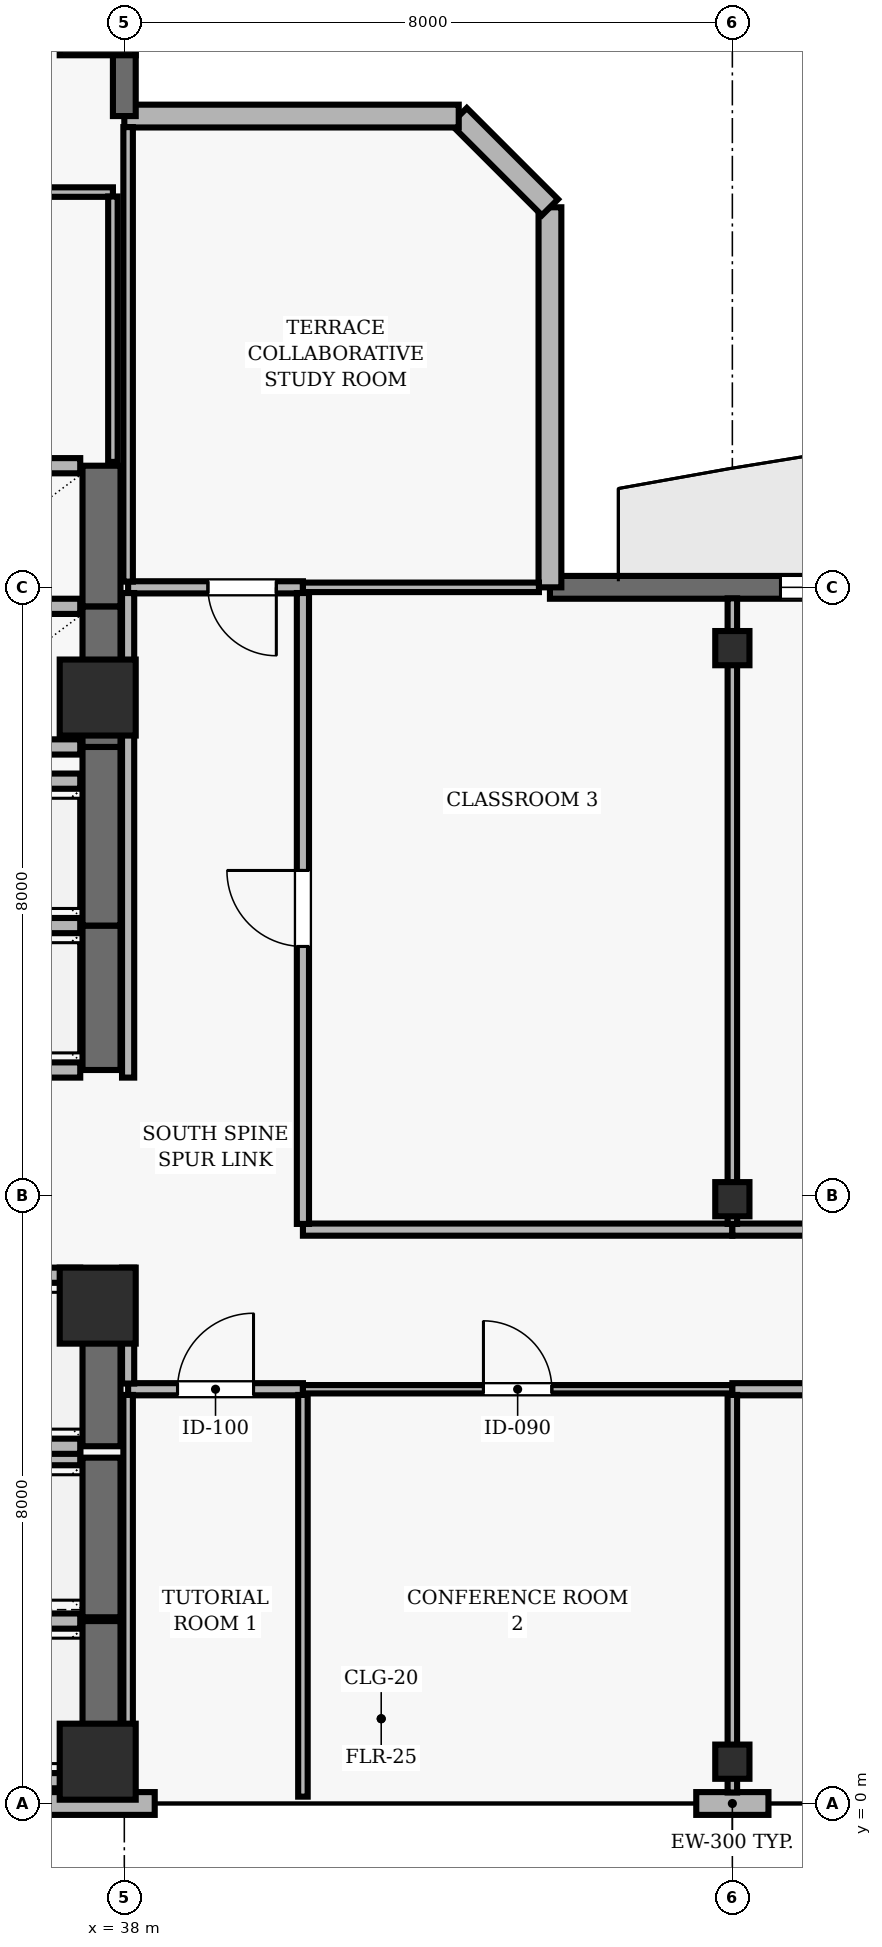
"""IFC4 building model, lengths in metres.
Left out: names, types, materials, properties, quantities, classifications, styles, units other than length and angle.
Written with IfcOpenShell. Run it as: python <this file> out.ifc"""

import sys

from ifc_helpers import new_model, si_unit, direction, frame, frame_2d, origin, origin_2d, place, context, subcontext, project, spatial, rectangle, hollow_rectangle, extrude, element, fill, save


model = new_model("IFC4")
c1 = context("Model", 3, precision=1e-05, world=origin(), true_north=direction((0.0, 1.0)))
c2 = subcontext(c1, "Body", "Model", "MODEL_VIEW")
j1 = project(units=[si_unit("LENGTHUNIT", "METRE"), si_unit("PLANEANGLEUNIT", "RADIAN")], contexts=[c1])
p1 = place(None, origin())
s1 = spatial("IfcSite", under=j1, at=p1, CompositionType="ELEMENT")
p2 = place(p1, origin())
s2 = spatial("IfcBuilding", under=s1, at=p2, CompositionType="ELEMENT")
p3 = place(p2, frame((0.0, 0.0, 230.4)))
s3 = spatial("IfcBuildingStorey", under=s2, at=p3, CompositionType="ELEMENT", Elevation=230.4)
for number, where, z_axis, x_axis in (
    (1, (37.65, 0.55, 0.0), (0.0, 0.0, 1.0), (1.0, 0.0, 0.0)),
    (2, (37.65, 6.55, 0.0), (0.0, 0.0, 1.0), (1.0, 0.0, 0.0)),
    (3, (37.65, 14.55, 0.0), (0.0, 0.0, 1.0), (1.0, 0.0, 0.0)),
    (4, (37.65, 23.5, 0.0), (0.0, 0.0, 1.0), (1.0, 0.0, 0.0)),
):
    element("IfcColumn", number, at=place(p3, frame(where, z_axis=z_axis, x_axis=x_axis)), inside=s3, PredefinedType="COLUMN", context=c2, shape_type="SweptSolid", body=[
        extrude(rectangle(XDim=1.0, YDim=1.0, at=origin_2d()), origin(), (0.0, 0.0, 1.0), 3.9),
    ])
for number, where, z_axis, x_axis in (
    (5, (46.0, 0.55, 0.0), (0.0, 0.0, 1.0), (1.0, 0.0, 0.0)),
    (6, (46.0, 7.95, 0.0), (0.0, 0.0, 1.0), (1.0, 0.0, 0.0)),
    (7, (46.0, 15.2, 0.0), (0.0, 0.0, 1.0), (1.0, 0.0, 0.0)),
):
    element("IfcColumn", number, at=place(p3, frame(where, z_axis=z_axis, x_axis=x_axis)), inside=s3, PredefinedType="COLUMN", context=c2, shape_type="SweptSolid", body=[
        extrude(hollow_rectangle(XDim=0.45, YDim=0.45, WallThickness=0.02, at=origin_2d()), origin(), (0.0, 0.0, 1.0), 3.9),
    ])
p4 = place(p3, frame((31.0, 0.0, 0.0), z_axis=(0.0, 0.0, 1.0), x_axis=(1.0, 0.0, 0.0)))
e8 = element("IfcWall", 8, at=p4, inside=s3, PredefinedType="SOLIDWALL", context=c2, shape_type="SweptSolid", body=[
    extrude(rectangle(XDim=7.4, YDim=0.3, at=frame_2d((3.7, 0.0))), origin(), (0.0, 0.0, 1.0), 3.69),
])
p5 = place(p3, frame((45.525, 0.0, 0.0), z_axis=(0.0, 0.0, 1.0), x_axis=(1.0, 0.0, 0.0)))
e9 = element("IfcWall", 9, at=p5, inside=s3, PredefinedType="SOLIDWALL", context=c2, shape_type="SweptSolid", body=[
    extrude(rectangle(XDim=0.95, YDim=0.3, at=frame_2d((0.475, 0.0))), origin(), (0.0, 0.0, 1.0), 3.69),
])
p6 = place(p3, frame((62.7, 16.0, 0.0), z_axis=(0.0, 0.0, 1.0), x_axis=(-1.0, 0.0, 0.0)))
e10 = element("IfcWall", 10, at=p6, inside=s3, PredefinedType="SOLIDWALL", context=c2, shape_type="SweptSolid", body=[
    extrude(rectangle(XDim=19.1, YDim=0.3, at=frame_2d((9.55, 0.0))), origin(), (0.0, 0.0, 1.0), 3.69),
])
p7 = place(p6, frame((6.75, 0.0, 0.0)))
e11 = element("IfcOpeningElement", 11, at=p7, cuts=e10, PredefinedType="OPENING", context=c2, shape_type="SweptSolid", body=[
    extrude(rectangle(XDim=1.0, YDim=2.2, at=frame_2d((0.5, 1.1))), frame((0.0, 0.16, 0.0), z_axis=(0.0, -1.0, 0.0), x_axis=(1.0, 0.0, 0.0)), (0.0, 0.0, 1.0), 0.32),
])
p8 = place(p6, frame((9.85, 0.0, 0.9)))
e12 = element("IfcOpeningElement", 12, at=p8, cuts=e10, PredefinedType="OPENING", context=c2, shape_type="SweptSolid", body=[
    extrude(rectangle(XDim=1.2, YDim=1.6, at=frame_2d((0.6, 0.8))), frame((0.0, 0.16, 0.0), z_axis=(0.0, -1.0, 0.0), x_axis=(1.0, 0.0, 0.0)), (0.0, 0.0, 1.0), 0.32),
])
p9 = place(p6, frame((14.867, 0.0, 0.9)))
e13 = element("IfcOpeningElement", 13, at=p9, cuts=e10, PredefinedType="OPENING", context=c2, shape_type="SweptSolid", body=[
    extrude(rectangle(XDim=1.2, YDim=1.6, at=frame_2d((0.6, 0.8))), frame((0.0, 0.16, 0.0), z_axis=(0.0, -1.0, 0.0), x_axis=(1.0, 0.0, 0.0)), (0.0, 0.0, 1.0), 0.32),
])
p10 = place(p3, frame((43.6, 16.0, 0.0), z_axis=(0.0, 0.0, 1.0), x_axis=(0.0, 1.0, 0.0)))
e14 = element("IfcWall", 14, at=p10, inside=s3, PredefinedType="SOLIDWALL", context=c2, shape_type="SweptSolid", body=[
    extrude(rectangle(XDim=5.0, YDim=0.3, at=frame_2d((2.5, 0.0))), origin(), (0.0, 0.0, 1.0), 3.69),
])
p11 = place(p3, frame((43.6, 21.0, 0.0), z_axis=(0.0, 0.0, 1.0), x_axis=(-0.707178703759, 0.707034851297, 0.0)))
e15 = element("IfcWall", 15, at=p11, inside=s3, PredefinedType="SOLIDWALL", context=c2, shape_type="SweptSolid", body=[
    extrude(rectangle(XDim=1.697, YDim=0.3, at=frame_2d((0.849, 0.0))), origin(), (0.0, 0.0, 1.0), 3.69),
])
p12 = place(p3, frame((42.4, 22.2, 0.0), z_axis=(0.0, 0.0, 1.0), x_axis=(-1.0, 0.0, 0.0)))
e16 = element("IfcWall", 16, at=p12, inside=s3, PredefinedType="SOLIDWALL", context=c2, shape_type="SweptSolid", body=[
    extrude(rectangle(XDim=4.4, YDim=0.3, at=frame_2d((2.2, 0.0))), origin(), (0.0, 0.0, 1.0), 3.69),
])
p13 = place(p3, frame((38.0, 22.2, 0.0), z_axis=(0.0, 0.0, 1.0), x_axis=(0.0, 1.0, 0.0)))
e17 = element("IfcWall", 17, at=p13, inside=s3, PredefinedType="SOLIDWALL", context=c2, shape_type="SweptSolid", body=[
    extrude(rectangle(XDim=18.5, YDim=0.3, at=frame_2d((9.25, 0.0))), origin(), (0.0, 0.0, 1.0), 3.69),
])
p14 = place(p13, frame((11.05, 0.0, 0.0)))
e18 = element("IfcOpeningElement", 18, at=p14, cuts=e17, PredefinedType="OPENING", context=c2, shape_type="SweptSolid", body=[
    extrude(rectangle(XDim=1.0, YDim=2.2, at=frame_2d((0.5, 1.1))), frame((0.0, 0.16, 0.0), z_axis=(0.0, -1.0, 0.0), x_axis=(1.0, 0.0, 0.0)), (0.0, 0.0, 1.0), 0.32),
])
p15 = place(p3, frame((37.7, 0.3, 0.0), z_axis=(0.0, 0.0, 1.0), x_axis=(0.0, 1.0, 0.0)))
e19 = element("IfcWall", 19, at=p15, inside=s3, PredefinedType="SHEAR", context=c2, shape_type="SweptSolid", body=[
    extrude(rectangle(XDim=2.1, YDim=0.5, at=frame_2d((1.05, 0.0))), origin(), (0.0, 0.0, 1.0), 3.69),
])
for number, where, z_axis, x_axis in (
    (20, (35.28, 0.3, 0.0), (0.0, 0.0, 1.0), (1.0, 0.0, 0.0)),
    (21, (37.42, 2.4, 0.0), (0.0, 0.0, 1.0), (-1.0, 0.0, 0.0)),
):
    element("IfcWall", number, at=place(p3, frame(where, z_axis=z_axis, x_axis=x_axis)), inside=s3, PredefinedType="SOLIDWALL", context=c2, shape_type="SweptSolid", body=[
        extrude(rectangle(XDim=2.14, YDim=0.2, at=frame_2d((1.07, 0.0))), origin(), (0.0, 0.0, 1.0), 3.69),
    ])
p16 = place(p3, frame((37.7, 2.45, 0.0), z_axis=(0.0, 0.0, 1.0), x_axis=(0.0, 1.0, 0.0)))
e22 = element("IfcWall", 22, at=p16, inside=s3, PredefinedType="SHEAR", context=c2, shape_type="SweptSolid", body=[
    extrude(rectangle(XDim=2.1, YDim=0.5, at=frame_2d((1.05, 0.0))), origin(), (0.0, 0.0, 1.0), 3.69),
])
p17 = place(p3, frame((37.42, 4.55, 0.0), z_axis=(0.0, 0.0, 1.0), x_axis=(-1.0, 0.0, 0.0)))
e23 = element("IfcWall", 23, at=p17, inside=s3, PredefinedType="SOLIDWALL", context=c2, shape_type="SweptSolid", body=[
    extrude(rectangle(XDim=2.14, YDim=0.2, at=frame_2d((1.07, 0.0))), origin(), (0.0, 0.0, 1.0), 3.69),
])
p18 = place(p3, frame((37.7, 4.7, 0.0), z_axis=(0.0, 0.0, 1.0), x_axis=(0.0, 1.0, 0.0)))
e24 = element("IfcWall", 24, at=p18, inside=s3, PredefinedType="SHEAR", context=c2, shape_type="SweptSolid", body=[
    extrude(rectangle(XDim=2.25, YDim=0.5, at=frame_2d((1.125, 0.0))), origin(), (0.0, 0.0, 1.0), 3.69),
])
for number, where, z_axis, x_axis in (
    (25, (35.28, 4.7, 0.0), (0.0, 0.0, 1.0), (1.0, 0.0, 0.0)),
    (26, (37.42, 6.95, 0.0), (0.0, 0.0, 1.0), (-1.0, 0.0, 0.0)),
):
    element("IfcWall", number, at=place(p3, frame(where, z_axis=z_axis, x_axis=x_axis)), inside=s3, PredefinedType="SOLIDWALL", context=c2, shape_type="SweptSolid", body=[
        extrude(rectangle(XDim=2.14, YDim=0.2, at=frame_2d((1.07, 0.0))), origin(), (0.0, 0.0, 1.0), 3.69),
    ])
p19 = place(p3, frame((37.7, 9.65, 0.0), z_axis=(0.0, 0.0, 1.0), x_axis=(0.0, 1.0, 0.0)))
e27 = element("IfcWall", 27, at=p19, inside=s3, PredefinedType="SHEAR", context=c2, shape_type="SweptSolid", body=[
    extrude(rectangle(XDim=1.9, YDim=0.5, at=frame_2d((0.95, 0.0))), origin(), (0.0, 0.0, 1.0), 3.69),
])
for number, where, z_axis, x_axis in (
    (28, (35.28, 9.65, 0.0), (0.0, 0.0, 1.0), (1.0, 0.0, 0.0)),
    (29, (37.42, 11.55, 0.0), (0.0, 0.0, 1.0), (-1.0, 0.0, 0.0)),
):
    element("IfcWall", number, at=place(p3, frame(where, z_axis=z_axis, x_axis=x_axis)), inside=s3, PredefinedType="SOLIDWALL", context=c2, shape_type="SweptSolid", body=[
        extrude(rectangle(XDim=2.14, YDim=0.2, at=frame_2d((1.07, 0.0))), origin(), (0.0, 0.0, 1.0), 3.69),
    ])
p20 = place(p3, frame((37.7, 11.55, 0.0), z_axis=(0.0, 0.0, 1.0), x_axis=(0.0, 1.0, 0.0)))
e30 = element("IfcWall", 30, at=p20, inside=s3, PredefinedType="SHEAR", context=c2, shape_type="SweptSolid", body=[
    extrude(rectangle(XDim=2.35, YDim=0.5, at=frame_2d((1.175, 0.0))), origin(), (0.0, 0.0, 1.0), 3.69),
])
p21 = place(p3, frame((37.42, 13.45, 0.0), z_axis=(0.0, 0.0, 1.0), x_axis=(-1.0, 0.0, 0.0)))
e31 = element("IfcWall", 31, at=p21, inside=s3, PredefinedType="SOLIDWALL", context=c2, shape_type="SweptSolid", body=[
    extrude(rectangle(XDim=2.14, YDim=0.2, at=frame_2d((1.07, 0.0))), origin(), (0.0, 0.0, 1.0), 3.69),
])
p22 = place(p3, frame((37.7, 13.9, 0.0), z_axis=(0.0, 0.0, 1.0), x_axis=(0.0, 1.0, 0.0)))
e32 = element("IfcWall", 32, at=p22, inside=s3, PredefinedType="SHEAR", context=c2, shape_type="SweptSolid", body=[
    extrude(rectangle(XDim=1.85, YDim=0.5, at=frame_2d((0.925, 0.0))), origin(), (0.0, 0.0, 1.0), 3.69),
])
for number, where, z_axis, x_axis in (
    (33, (35.28, 13.9, 0.0), (0.0, 0.0, 1.0), (1.0, 0.0, 0.0)),
    (34, (37.42, 15.75, 0.0), (0.0, 0.0, 1.0), (-1.0, 0.0, 0.0)),
):
    element("IfcWall", number, at=place(p3, frame(where, z_axis=z_axis, x_axis=x_axis)), inside=s3, PredefinedType="SOLIDWALL", context=c2, shape_type="SweptSolid", body=[
        extrude(rectangle(XDim=2.14, YDim=0.2, at=frame_2d((1.07, 0.0))), origin(), (0.0, 0.0, 1.0), 3.69),
    ])
p23 = place(p3, frame((37.7, 15.75, 0.0), z_axis=(0.0, 0.0, 1.0), x_axis=(0.0, 1.0, 0.0)))
e35 = element("IfcWall", 35, at=p23, inside=s3, PredefinedType="SHEAR", context=c2, shape_type="SweptSolid", body=[
    extrude(rectangle(XDim=1.85, YDim=0.5, at=frame_2d((0.925, 0.0))), origin(), (0.0, 0.0, 1.0), 3.69),
])
p24 = place(p3, frame((37.42, 17.6, 0.0), z_axis=(0.0, 0.0, 1.0), x_axis=(-1.0, 0.0, 0.0)))
e36 = element("IfcWall", 36, at=p24, inside=s3, PredefinedType="SOLIDWALL", context=c2, shape_type="SweptSolid", body=[
    extrude(rectangle(XDim=2.14, YDim=0.2, at=frame_2d((1.07, 0.0))), origin(), (0.0, 0.0, 1.0), 3.69),
])
p25 = place(p3, frame((35.85, 21.2, 0.0), z_axis=(0.0, 0.0, 1.0), x_axis=(1.0, 0.0, 0.0)))
e37 = element("IfcWall", 37, at=p25, inside=s3, PredefinedType="PARTITIONING", context=c2, shape_type="SweptSolid", body=[
    extrude(rectangle(XDim=2.0, YDim=0.125, at=frame_2d((1.0, 0.0))), origin(), (0.0, 0.0, 1.0), 3.69),
])
p26 = place(p3, frame((38.05, 5.45, 0.0), z_axis=(0.0, 0.0, 1.0), x_axis=(1.0, 0.0, 0.0)))
e38 = element("IfcWall", 38, at=p26, inside=s3, PredefinedType="PARTITIONING", context=c2, shape_type="SweptSolid", body=[
    extrude(rectangle(XDim=2.3, YDim=0.16, at=frame_2d((1.15, 0.0))), origin(), (0.0, 0.0, 1.0), 3.343),
])
p27 = place(p26, frame((0.65, 0.0, 0.0)))
e39 = element("IfcOpeningElement", 39, at=p27, cuts=e38, PredefinedType="OPENING", context=c2, shape_type="SweptSolid", body=[
    extrude(rectangle(XDim=1.0, YDim=2.1, at=frame_2d((0.5, 1.05))), frame((0.0, 0.09, 0.0), z_axis=(0.0, -1.0, 0.0), x_axis=(1.0, 0.0, 0.0)), (0.0, 0.0, 1.0), 0.18),
])
p28 = place(p3, frame((40.35, 5.45, 0.0), z_axis=(0.0, 0.0, 1.0), x_axis=(1.0, 0.0, 0.0)))
e40 = element("IfcWall", 40, at=p28, inside=s3, PredefinedType="MOVABLE", context=c2, shape_type="SweptSolid", body=[
    extrude(rectangle(XDim=5.65, YDim=0.11, at=frame_2d((2.825, 0.0))), origin(), (0.0, 0.0, 1.0), 3.343),
])
p29 = place(p28, frame((2.375, 0.0, 0.0)))
e41 = element("IfcOpeningElement", 41, at=p29, cuts=e40, PredefinedType="OPENING", context=c2, shape_type="SweptSolid", body=[
    extrude(rectangle(XDim=0.9, YDim=2.1, at=frame_2d((0.45, 1.05))), frame((0.0, 0.065, 0.0), z_axis=(0.0, -1.0, 0.0), x_axis=(1.0, 0.0, 0.0)), (0.0, 0.0, 1.0), 0.13),
])
p30 = place(p3, frame((40.35, 16.0, 0.0), z_axis=(0.0, 0.0, 1.0), x_axis=(-1.0, 0.0, 0.0)))
e42 = element("IfcWall", 42, at=p30, inside=s3, PredefinedType="PARTITIONING", context=c2, shape_type="SweptSolid", body=[
    extrude(rectangle(XDim=2.3, YDim=0.16, at=frame_2d((1.15, 0.0))), origin(), (0.0, 0.0, 1.0), 3.39),
])
p31 = place(p30, frame((0.35, 0.0, 0.0)))
e43 = element("IfcOpeningElement", 43, at=p31, cuts=e42, PredefinedType="OPENING", context=c2, shape_type="SweptSolid", body=[
    extrude(rectangle(XDim=0.9, YDim=2.1, at=frame_2d((0.45, 1.05))), frame((0.0, 0.09, 0.0), z_axis=(0.0, -1.0, 0.0), x_axis=(1.0, 0.0, 0.0)), (0.0, 0.0, 1.0), 0.18),
])
p32 = place(p3, frame((40.35, 16.0, 0.0), z_axis=(0.0, 0.0, 1.0), x_axis=(1.0, 0.0, 0.0)))
e44 = element("IfcWall", 44, at=p32, inside=s3, PredefinedType="PARTITIONING", context=c2, shape_type="SweptSolid", body=[
    extrude(rectangle(XDim=3.105, YDim=0.125, at=frame_2d((1.552, 0.0))), origin(), (0.0, 0.0, 1.0), 3.39),
])
p33 = place(p3, frame((46.0, 5.45, 0.0), z_axis=(0.0, 0.0, 1.0), x_axis=(1.0, 0.0, 0.0)))
e45 = element("IfcWall", 45, at=p33, inside=s3, PredefinedType="PARTITIONING", context=c2, shape_type="SweptSolid", body=[
    extrude(rectangle(XDim=7.52, YDim=0.16, at=frame_2d((3.76, 0.0))), origin(), (0.0, 0.0, 1.0), 3.343),
])
p34 = place(p33, frame((3.31, 0.0, 0.0)))
e46 = element("IfcOpeningElement", 46, at=p34, cuts=e45, PredefinedType="OPENING", context=c2, shape_type="SweptSolid", body=[
    extrude(rectangle(XDim=0.9, YDim=2.1, at=frame_2d((0.45, 1.05))), frame((0.0, 0.09, 0.0), z_axis=(0.0, -1.0, 0.0), x_axis=(1.0, 0.0, 0.0)), (0.0, 0.0, 1.0), 0.18),
])
p35 = place(p3, frame((46.0, 7.55, 0.0), z_axis=(0.0, 0.0, 1.0), x_axis=(-1.0, 0.0, 0.0)))
e47 = element("IfcWall", 47, at=p35, inside=s3, PredefinedType="PARTITIONING", context=c2, shape_type="SweptSolid", body=[
    extrude(rectangle(XDim=5.65, YDim=0.16, at=frame_2d((2.825, 0.0))), origin(), (0.0, 0.0, 1.0), 3.139),
])
p36 = place(p3, frame((53.52, 7.55, 0.0), z_axis=(0.0, 0.0, 1.0), x_axis=(-1.0, 0.0, 0.0)))
e48 = element("IfcWall", 48, at=p36, inside=s3, PredefinedType="PARTITIONING", context=c2, shape_type="SweptSolid", body=[
    extrude(rectangle(XDim=7.52, YDim=0.16, at=frame_2d((3.76, 0.0))), origin(), (0.0, 0.0, 1.0), 3.139),
])
p37 = place(p36, frame((3.26, 0.0, 0.0)))
e49 = element("IfcOpeningElement", 49, at=p37, cuts=e48, PredefinedType="OPENING", context=c2, shape_type="SweptSolid", body=[
    extrude(rectangle(XDim=1.0, YDim=2.1, at=frame_2d((0.5, 1.05))), frame((0.0, 0.09, 0.0), z_axis=(0.0, -1.0, 0.0), x_axis=(1.0, 0.0, 0.0)), (0.0, 0.0, 1.0), 0.18),
])
p38 = place(p3, frame((37.85, 17.65, 0.0), z_axis=(0.0, 0.0, 1.0), x_axis=(0.0, 1.0, 0.0)))
e50 = element("IfcWall", 50, at=p38, inside=s3, PredefinedType="PARTITIONING", context=c2, shape_type="SweptSolid", body=[
    extrude(rectangle(XDim=3.492, YDim=0.125, at=frame_2d((1.746, 0.0))), origin(), (0.0, 0.0, 1.0), 3.139),
])
p39 = place(p3, frame((38.05, 5.375, 0.0), z_axis=(0.0, 0.0, 1.0), x_axis=(0.0, -1.0, 0.0)))
e51 = element("IfcWall", 51, at=p39, inside=s3, PredefinedType="PARTITIONING", context=c2, shape_type="SweptSolid", body=[
    extrude(rectangle(XDim=5.23, YDim=0.125, at=frame_2d((2.615, 0.0))), origin(), (0.0, 0.0, 1.0), 3.139),
])
p40 = place(p3, frame((38.05, 7.05, 0.0), z_axis=(0.0, 0.0, 1.0), x_axis=(0.0, -1.0, 0.0)))
e52 = element("IfcWall", 52, at=p40, inside=s3, PredefinedType="PARTITIONING", context=c2, shape_type="SweptSolid", body=[
    extrude(rectangle(XDim=1.525, YDim=0.16, at=frame_2d((0.763, 0.0))), origin(), (0.0, 0.0, 1.0), 3.139),
])
p41 = place(p3, frame((38.05, 15.925, 0.0), z_axis=(0.0, 0.0, 1.0), x_axis=(0.0, -1.0, 0.0)))
e53 = element("IfcWall", 53, at=p41, inside=s3, PredefinedType="PARTITIONING", context=c2, shape_type="SweptSolid", body=[
    extrude(rectangle(XDim=6.375, YDim=0.16, at=frame_2d((3.188, 0.0))), origin(), (0.0, 0.0, 1.0), 3.139),
])
p42 = place(p3, frame((38.05, 22.055, 0.0), z_axis=(0.0, 0.0, 1.0), x_axis=(0.0, -1.0, 0.0)))
e54 = element("IfcWall", 54, at=p42, inside=s3, PredefinedType="PARTITIONING", context=c2, shape_type="SweptSolid", body=[
    extrude(rectangle(XDim=5.98, YDim=0.125, at=frame_2d((2.99, 0.0))), origin(), (0.0, 0.0, 1.0), 3.139),
])
p43 = place(p3, frame((40.35, 0.09, 0.0), z_axis=(0.0, 0.0, 1.0), x_axis=(0.0, 1.0, 0.0)))
e55 = element("IfcWall", 55, at=p43, inside=s3, PredefinedType="PARTITIONING", context=c2, shape_type="SweptSolid", body=[
    extrude(rectangle(XDim=5.285, YDim=0.125, at=frame_2d((2.643, 0.0))), origin(), (0.0, 0.0, 1.0), 3.69),
])
p44 = place(p3, frame((40.35, 7.625, 0.0), z_axis=(0.0, 0.0, 1.0), x_axis=(0.0, 1.0, 0.0)))
e56 = element("IfcWall", 56, at=p44, inside=s3, PredefinedType="PARTITIONING", context=c2, shape_type="SweptSolid", body=[
    extrude(rectangle(XDim=8.3, YDim=0.16, at=frame_2d((4.15, 0.0))), origin(), (0.0, 0.0, 1.0), 3.69),
])
p45 = place(p44, frame((3.65, 0.0, 0.0)))
e57 = element("IfcOpeningElement", 57, at=p45, cuts=e56, PredefinedType="OPENING", context=c2, shape_type="SweptSolid", body=[
    extrude(rectangle(XDim=1.0, YDim=2.1, at=frame_2d((0.5, 1.05))), frame((0.0, 0.09, 0.0), z_axis=(0.0, -1.0, 0.0), x_axis=(1.0, 0.0, 0.0)), (0.0, 0.0, 1.0), 0.18),
])
p46 = place(p3, frame((46.0, 0.145, 0.0), z_axis=(0.0, 0.0, 1.0), x_axis=(0.0, 1.0, 0.0)))
e58 = element("IfcWall", 58, at=p46, inside=s3, PredefinedType="PARTITIONING", context=c2, shape_type="SweptSolid", body=[
    extrude(rectangle(XDim=5.23, YDim=0.125, at=frame_2d((2.615, 0.0))), origin(), (0.0, 0.0, 1.0), 3.139),
])
p47 = place(p3, frame((46.0, 7.625, 0.0), z_axis=(0.0, 0.0, 1.0), x_axis=(0.0, 1.0, 0.0)))
e59 = element("IfcWall", 59, at=p47, inside=s3, PredefinedType="PARTITIONING", context=c2, shape_type="SweptSolid", body=[
    extrude(rectangle(XDim=8.23, YDim=0.125, at=frame_2d((4.115, 0.0))), origin(), (0.0, 0.0, 1.0), 3.139),
])
p48 = place(p9, origin())
e60 = element("IfcWindow", 60, at=p48, inside=s3, PartitioningType="SINGLE_PANEL", PredefinedType="WINDOW", context=c2, shape_type="SweptSolid", body=[
    extrude(rectangle(XDim=1.2, YDim=1.6, at=frame_2d((0.6, 0.8))), frame((0.0, 0.03, 0.0), z_axis=(0.0, -1.0, 0.0), x_axis=(1.0, 0.0, 0.0)), (0.0, 0.0, 1.0), 0.06),
])
fill(e13, e60)
p49 = place(p27, origin())
e61 = element("IfcDoor", 61, at=p49, inside=s3, OperationType="SINGLE_SWING_RIGHT", PredefinedType="DOOR", context=c2, shape_type="SweptSolid", body=[
    extrude(rectangle(XDim=1.0, YDim=2.1, at=frame_2d((0.5, 1.05))), frame((0.0, 0.025, 0.0), z_axis=(0.0, -1.0, 0.0), x_axis=(1.0, 0.0, 0.0)), (0.0, 0.0, 1.0), 0.05),
])
fill(e39, e61)
p50 = place(p29, origin())
e62 = element("IfcDoor", 62, at=p50, inside=s3, OperationType="SINGLE_SWING_LEFT", PredefinedType="DOOR", context=c2, shape_type="SweptSolid", body=[
    extrude(rectangle(XDim=0.9, YDim=2.1, at=frame_2d((0.45, 1.05))), frame((0.0, 0.025, 0.0), z_axis=(0.0, -1.0, 0.0), x_axis=(1.0, 0.0, 0.0)), (0.0, 0.0, 1.0), 0.05),
])
fill(e41, e62)
p51 = place(p45, origin())
e63 = element("IfcDoor", 63, at=p51, inside=s3, OperationType="SINGLE_SWING_RIGHT", PredefinedType="DOOR", context=c2, shape_type="SweptSolid", body=[
    extrude(rectangle(XDim=1.0, YDim=2.1, at=frame_2d((0.5, 1.05))), frame((0.0, 0.025, 0.0), z_axis=(0.0, -1.0, 0.0), x_axis=(1.0, 0.0, 0.0)), (0.0, 0.0, 1.0), 0.05),
])
fill(e57, e63)
p52 = place(p31, origin())
e64 = element("IfcDoor", 64, at=p52, inside=s3, OperationType="SINGLE_SWING_LEFT", PredefinedType="DOOR", context=c2, shape_type="SweptSolid", body=[
    extrude(rectangle(XDim=0.9, YDim=2.1, at=frame_2d((0.45, 1.05))), frame((0.0, 0.025, 0.0), z_axis=(0.0, -1.0, 0.0), x_axis=(1.0, 0.0, 0.0)), (0.0, 0.0, 1.0), 0.05),
])
fill(e43, e64)
save(model, sys.argv[1])
